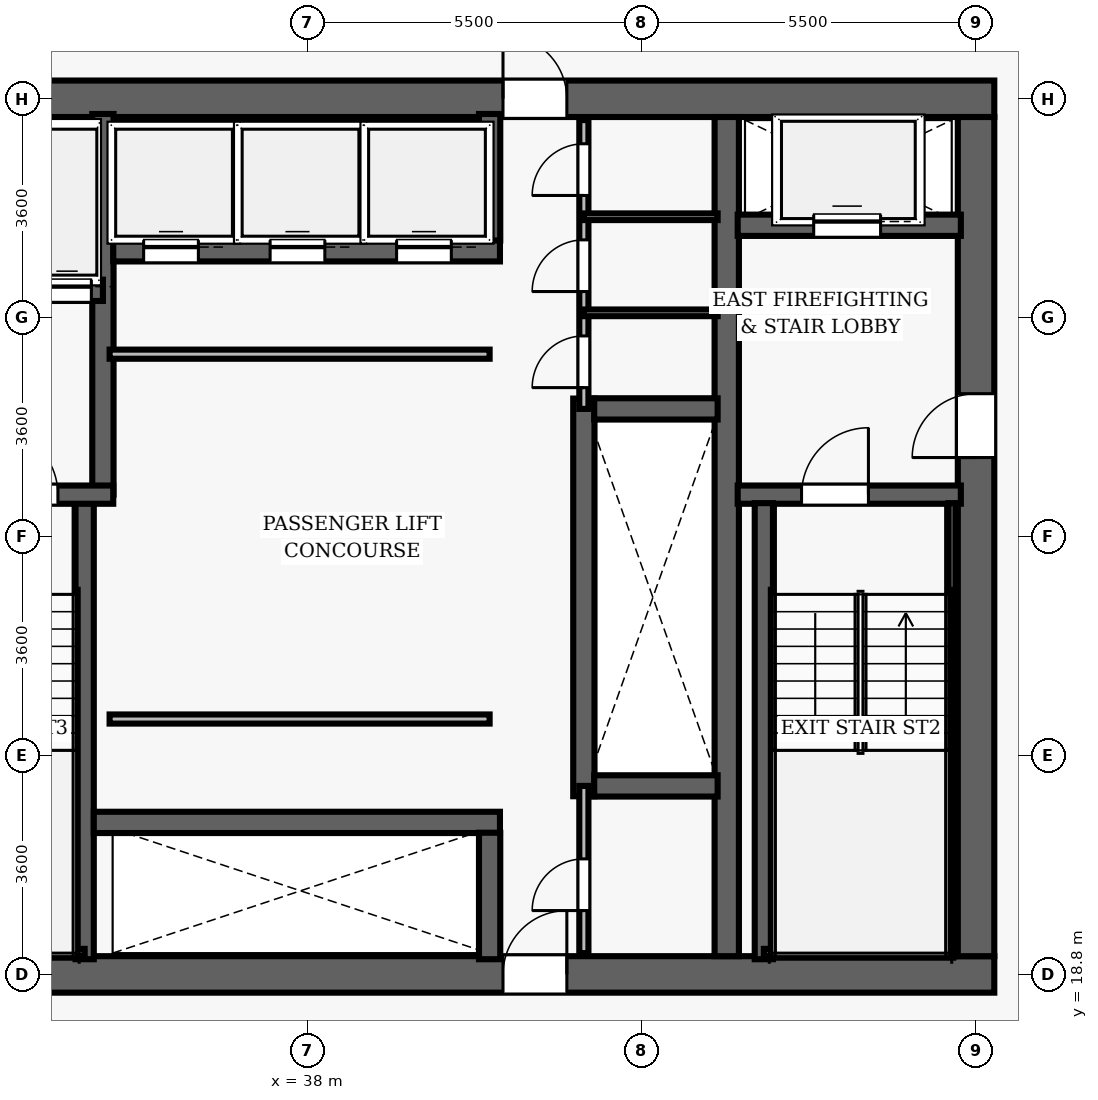
"""IFC4 building model, lengths in metres.
Left out: names, types, materials, properties, quantities, classifications, styles, units other than length and angle.
Written with IfcOpenShell. Run it as: python <this file> out.ifc"""

import sys

from ifc_helpers import new_model, si_unit, direction, frame, frame_2d, origin, place, context, subcontext, project, spatial, rectangle, extrude, element, fill, save


model = new_model("IFC4")
c1 = context("Model", 3, precision=1e-05, world=origin(), true_north=direction((0.0, 1.0)))
c2 = subcontext(c1, "Body", "Model", "MODEL_VIEW")
j1 = project(units=[si_unit("LENGTHUNIT", "METRE"), si_unit("PLANEANGLEUNIT", "RADIAN")], contexts=[c1])
p1 = place(None, origin())
s1 = spatial("IfcSite", under=j1, at=p1, CompositionType="ELEMENT")
p2 = place(p1, origin())
s2 = spatial("IfcBuilding", under=s1, at=p2, CompositionType="ELEMENT")
p3 = place(p2, frame((0.0, 0.0, 51.9)))
s3 = spatial("IfcBuildingStorey", under=s2, at=p3, CompositionType="ELEMENT", Elevation=51.9)
p4 = place(p3, frame((26.7, 18.8, 0.0), z_axis=(0.0, 0.0, 1.0), x_axis=(1.0, 0.0, 0.0)))
e1 = element("IfcWall", 1, at=p4, inside=s3, PredefinedType="SHEAR", context=c2, shape_type="SweptSolid", body=[
    extrude(rectangle(XDim=22.6, YDim=0.6, at=frame_2d((11.3, 0.0))), origin(), (0.0, 0.0, 1.0), 3.5),
])
p5 = place(p4, frame((14.52, 0.0, 0.0)))
e2 = element("IfcOpeningElement", 2, at=p5, cuts=e1, PredefinedType="OPENING", context=c2, shape_type="SweptSolid", body=[
    extrude(rectangle(XDim=1.05, YDim=2.15, at=frame_2d((0.525, 1.075))), frame((0.0, 0.31, 0.0), z_axis=(0.0, -1.0, 0.0), x_axis=(1.0, 0.0, 0.0)), (0.0, 0.0, 1.0), 0.62),
])
p6 = place(p3, frame((26.7, 33.2, 0.0), z_axis=(0.0, 0.0, 1.0), x_axis=(1.0, 0.0, 0.0)))
e3 = element("IfcWall", 3, at=p6, inside=s3, PredefinedType="SHEAR", context=c2, shape_type="SweptSolid", body=[
    extrude(rectangle(XDim=22.6, YDim=0.6, at=frame_2d((11.3, 0.0))), origin(), (0.0, 0.0, 1.0), 3.5),
])
p7 = place(p6, frame((4.62, 0.0, 0.0)))
e4 = element("IfcOpeningElement", 4, at=p7, cuts=e3, PredefinedType="OPENING", context=c2, shape_type="SweptSolid", body=[
    extrude(rectangle(XDim=1.05, YDim=2.15, at=frame_2d((0.525, 1.075))), frame((0.0, 0.31, 0.0), z_axis=(0.0, -1.0, 0.0), x_axis=(1.0, 0.0, 0.0)), (0.0, 0.0, 1.0), 0.62),
])
p8 = place(p6, frame((14.52, 0.0, 0.0)))
e5 = element("IfcOpeningElement", 5, at=p8, cuts=e3, PredefinedType="OPENING", context=c2, shape_type="SweptSolid", body=[
    extrude(rectangle(XDim=1.05, YDim=2.15, at=frame_2d((0.525, 1.075))), frame((0.0, 0.31, 0.0), z_axis=(0.0, -1.0, 0.0), x_axis=(1.0, 0.0, 0.0)), (0.0, 0.0, 1.0), 0.62),
])
p9 = place(p3, frame((49.0, 19.1, 0.0), z_axis=(0.0, 0.0, 1.0), x_axis=(0.0, 1.0, 0.0)))
e6 = element("IfcWall", 6, at=p9, inside=s3, PredefinedType="SHEAR", context=c2, shape_type="SweptSolid", body=[
    extrude(rectangle(XDim=13.8, YDim=0.6, at=frame_2d((6.9, 0.0))), origin(), (0.0, 0.0, 1.0), 3.5),
])
p10 = place(p9, frame((8.2, 0.0, 0.0)))
e7 = element("IfcOpeningElement", 7, at=p10, cuts=e6, PredefinedType="OPENING", context=c2, shape_type="SweptSolid", body=[
    extrude(rectangle(XDim=1.05, YDim=2.15, at=frame_2d((0.525, 1.075))), frame((0.0, 0.31, 0.0), z_axis=(0.0, -1.0, 0.0), x_axis=(1.0, 0.0, 0.0)), (0.0, 0.0, 1.0), 0.62),
])
p11 = place(p3, frame((44.9, 19.1, 0.0), z_axis=(0.0, 0.0, 1.0), x_axis=(0.0, 1.0, 0.0)))
e8 = element("IfcWall", 8, at=p11, inside=s3, PredefinedType="SHEAR", context=c2, shape_type="SweptSolid", body=[
    extrude(rectangle(XDim=13.8, YDim=0.4, at=frame_2d((6.9, 0.0))), origin(), (0.0, 0.0, 1.0), 3.5),
])
p12 = place(p3, frame((45.08, 26.69, 0.0), z_axis=(0.0, 0.0, 1.0), x_axis=(1.0, 0.0, 0.0)))
e9 = element("IfcWall", 9, at=p12, inside=s3, PredefinedType="SHEAR", context=c2, shape_type="SweptSolid", body=[
    extrude(rectangle(XDim=3.67, YDim=0.3, at=frame_2d((1.835, 0.0))), origin(), (0.0, 0.0, 1.0), 3.5),
])
p13 = place(p12, frame((1.05, 0.0, 0.0)))
e10 = element("IfcOpeningElement", 10, at=p13, cuts=e9, PredefinedType="OPENING", context=c2, shape_type="SweptSolid", body=[
    extrude(rectangle(XDim=1.1, YDim=2.15, at=frame_2d((0.55, 1.075))), frame((0.0, 0.16, 0.0), z_axis=(0.0, -1.0, 0.0), x_axis=(1.0, 0.0, 0.0)), (0.0, 0.0, 1.0), 0.32),
])
p14 = place(p3, frame((45.51, 19.05, 0.0), z_axis=(0.0, 0.0, 1.0), x_axis=(0.0, 1.0, 0.0)))
e11 = element("IfcWall", 11, at=p14, inside=s3, PredefinedType="SHEAR", context=c2, shape_type="SweptSolid", body=[
    extrude(rectangle(XDim=7.5, YDim=0.3, at=frame_2d((3.75, 0.0))), origin(), (0.0, 0.0, 1.0), 3.5),
])
p15 = place(p3, frame((48.605, 19.1, 0.0), z_axis=(0.0, 0.0, 1.0), x_axis=(0.0, 1.0, 0.0)))
e12 = element("IfcWall", 12, at=p15, inside=s3, PredefinedType="SHEAR", context=c2, shape_type="SweptSolid", body=[
    extrude(rectangle(XDim=7.45, YDim=0.12, at=frame_2d((3.725, 0.0))), origin(), (0.0, 0.0, 1.0), 3.5),
])
p16 = place(p3, frame((45.51, 19.16, 0.0), z_axis=(0.0, 0.0, 1.0), x_axis=(1.0, 0.0, 0.0)))
e13 = element("IfcWall", 13, at=p16, inside=s3, PredefinedType="SHEAR", context=c2, shape_type="SweptSolid", body=[
    extrude(rectangle(XDim=3.095, YDim=0.12, at=frame_2d((1.547, 0.0))), origin(), (0.0, 0.0, 1.0), 3.5),
])
p17 = place(p3, frame((45.08, 31.12, 0.0), z_axis=(0.0, 0.0, 1.0), x_axis=(1.0, 0.0, 0.0)))
e14 = element("IfcWall", 14, at=p17, inside=s3, PredefinedType="SHEAR", context=c2, shape_type="SweptSolid", body=[
    extrude(rectangle(XDim=3.67, YDim=0.35, at=frame_2d((1.835, 0.0))), origin(), (0.0, 0.0, 1.0), 2.6),
])
p18 = place(p17, frame((1.25, 0.0, 0.0)))
e15 = element("IfcOpeningElement", 15, at=p18, cuts=e14, PredefinedType="OPENING", context=c2, shape_type="SweptSolid", body=[
    extrude(rectangle(XDim=1.1, YDim=2.15, at=frame_2d((0.55, 1.075))), frame((0.0, 0.185, 0.0), z_axis=(0.0, -1.0, 0.0), x_axis=(1.0, 0.0, 0.0)), (0.0, 0.0, 1.0), 0.37),
])
p19 = place(p3, frame((34.34, 19.05, 0.0), z_axis=(0.0, 0.0, 1.0), x_axis=(0.0, 1.0, 0.0)))
e16 = element("IfcWall", 16, at=p19, inside=s3, PredefinedType="SHEAR", context=c2, shape_type="SweptSolid", body=[
    extrude(rectangle(XDim=7.5, YDim=0.3, at=frame_2d((3.75, 0.0))), origin(), (0.0, 0.0, 1.0), 3.5),
])
p20 = place(p3, frame((34.64, 26.69, 0.0), z_axis=(0.0, 0.0, 1.0), x_axis=(0.0, 1.0, 0.0)))
e17 = element("IfcWall", 17, at=p20, inside=s3, PredefinedType="SHEAR", context=c2, shape_type="SweptSolid", body=[
    extrude(rectangle(XDim=6.26, YDim=0.35, at=frame_2d((3.13, 0.0))), origin(), (0.0, 0.0, 1.0), 3.5),
])
p21 = place(p3, frame((31.25, 26.69, 0.0), z_axis=(0.0, 0.0, 1.0), x_axis=(1.0, 0.0, 0.0)))
e18 = element("IfcWall", 18, at=p21, inside=s3, PredefinedType="SHEAR", context=c2, shape_type="SweptSolid", body=[
    extrude(rectangle(XDim=3.56, YDim=0.3, at=frame_2d((1.78, 0.0))), origin(), (0.0, 0.0, 1.0), 3.5),
])
p22 = place(p21, frame((1.55, 0.0, 0.0)))
e19 = element("IfcOpeningElement", 19, at=p22, cuts=e18, PredefinedType="OPENING", context=c2, shape_type="SweptSolid", body=[
    extrude(rectangle(XDim=1.1, YDim=2.15, at=frame_2d((0.55, 1.075))), frame((0.0, 0.16, 0.0), z_axis=(0.0, -1.0, 0.0), x_axis=(1.0, 0.0, 0.0)), (0.0, 0.0, 1.0), 0.32),
])
p23 = place(p3, frame((31.3, 19.16, 0.0), z_axis=(0.0, 0.0, 1.0), x_axis=(1.0, 0.0, 0.0)))
e20 = element("IfcWall", 20, at=p23, inside=s3, PredefinedType="SHEAR", context=c2, shape_type="SweptSolid", body=[
    extrude(rectangle(XDim=3.04, YDim=0.12, at=frame_2d((1.52, 0.0))), origin(), (0.0, 0.0, 1.0), 3.5),
])
p24 = place(p3, frame((32.23, 30.05, 0.0), z_axis=(0.0, 0.0, 1.0), x_axis=(1.0, 0.0, 0.0)))
e21 = element("IfcWall", 21, at=p24, inside=s3, PredefinedType="SHEAR", context=c2, shape_type="SweptSolid", body=[
    extrude(rectangle(XDim=2.41, YDim=0.35, at=frame_2d((1.205, 0.0))), origin(), (0.0, 0.0, 1.0), 2.6),
])
p25 = place(p24, frame((0.42, 0.0, 0.0)))
e22 = element("IfcOpeningElement", 22, at=p25, cuts=e21, PredefinedType="OPENING", context=c2, shape_type="SweptSolid", body=[
    extrude(rectangle(XDim=0.8, YDim=2.15, at=frame_2d((0.4, 1.075))), frame((0.0, 0.185, 0.0), z_axis=(0.0, -1.0, 0.0), x_axis=(1.0, 0.0, 0.0)), (0.0, 0.0, 1.0), 0.37),
])
p26 = place(p24, frame((1.42, 0.0, 0.0)))
e23 = element("IfcOpeningElement", 23, at=p26, cuts=e21, PredefinedType="OPENING", context=c2, shape_type="SweptSolid", body=[
    extrude(rectangle(XDim=0.8, YDim=2.15, at=frame_2d((0.4, 1.075))), frame((0.0, 0.185, 0.0), z_axis=(0.0, -1.0, 0.0), x_axis=(1.0, 0.0, 0.0)), (0.0, 0.0, 1.0), 0.37),
])
p27 = place(p3, frame((42.55, 21.73, 0.0), z_axis=(0.0, 0.0, 1.0), x_axis=(0.0, 1.0, 0.0)))
e24 = element("IfcWall", 24, at=p27, inside=s3, PredefinedType="SHEAR", context=c2, shape_type="SweptSolid", body=[
    extrude(rectangle(XDim=6.54, YDim=0.35, at=frame_2d((3.27, 0.0))), origin(), (0.0, 0.0, 1.0), 2.6),
])
for number, where, z_axis, x_axis in (
    (25, (42.72, 21.9, 0.0), (0.0, 0.0, 1.0), (1.0, 0.0, 0.0)),
    (26, (42.72, 28.1, 0.0), (0.0, 0.0, 1.0), (1.0, 0.0, 0.0)),
):
    element("IfcWall", number, at=place(p3, frame(where, z_axis=z_axis, x_axis=x_axis)), inside=s3, PredefinedType="SHEAR", context=c2, shape_type="SweptSolid", body=[
        extrude(rectangle(XDim=2.03, YDim=0.35, at=frame_2d((1.015, 0.0))), origin(), (0.0, 0.0, 1.0), 2.6),
    ])
p28 = place(p3, frame((34.81, 30.7, 0.0), z_axis=(0.0, 0.0, 1.0), x_axis=(1.0, 0.0, 0.0)))
e27 = element("IfcWall", 27, at=p28, inside=s3, PredefinedType="SHEAR", context=c2, shape_type="SweptSolid", body=[
    extrude(rectangle(XDim=6.36, YDim=0.35, at=frame_2d((3.18, 0.0))), origin(), (0.0, 0.0, 1.0), 2.6),
])
p29 = place(p28, frame((0.5, 0.0, 0.0)))
e28 = element("IfcOpeningElement", 28, at=p29, cuts=e27, PredefinedType="OPENING", context=c2, shape_type="SweptSolid", body=[
    extrude(rectangle(XDim=0.9, YDim=2.15, at=frame_2d((0.45, 1.075))), frame((0.0, 0.185, 0.0), z_axis=(0.0, -1.0, 0.0), x_axis=(1.0, 0.0, 0.0)), (0.0, 0.0, 1.0), 0.37),
])
p30 = place(p28, frame((2.58, 0.0, 0.0)))
e29 = element("IfcOpeningElement", 29, at=p30, cuts=e27, PredefinedType="OPENING", context=c2, shape_type="SweptSolid", body=[
    extrude(rectangle(XDim=0.9, YDim=2.15, at=frame_2d((0.45, 1.075))), frame((0.0, 0.185, 0.0), z_axis=(0.0, -1.0, 0.0), x_axis=(1.0, 0.0, 0.0)), (0.0, 0.0, 1.0), 0.37),
])
p31 = place(p28, frame((4.66, 0.0, 0.0)))
e30 = element("IfcOpeningElement", 30, at=p31, cuts=e27, PredefinedType="OPENING", context=c2, shape_type="SweptSolid", body=[
    extrude(rectangle(XDim=0.9, YDim=2.15, at=frame_2d((0.45, 1.075))), frame((0.0, 0.185, 0.0), z_axis=(0.0, -1.0, 0.0), x_axis=(1.0, 0.0, 0.0)), (0.0, 0.0, 1.0), 0.37),
])
p32 = place(p3, frame((41.0, 30.87, 0.0), z_axis=(0.0, 0.0, 1.0), x_axis=(0.0, 1.0, 0.0)))
e31 = element("IfcWall", 31, at=p32, inside=s3, PredefinedType="SHEAR", context=c2, shape_type="SweptSolid", body=[
    extrude(rectangle(XDim=2.08, YDim=0.35, at=frame_2d((1.04, 0.0))), origin(), (0.0, 0.0, 1.0), 2.6),
])
p33 = place(p3, frame((34.49, 21.3, 0.0), z_axis=(0.0, 0.0, 1.0), x_axis=(1.0, 0.0, 0.0)))
e32 = element("IfcWall", 32, at=p33, inside=s3, PredefinedType="SHEAR", context=c2, shape_type="SweptSolid", body=[
    extrude(rectangle(XDim=6.68, YDim=0.35, at=frame_2d((3.34, 0.0))), origin(), (0.0, 0.0, 1.0), 2.6),
])
p34 = place(p3, frame((41.0, 19.05, 0.0), z_axis=(0.0, 0.0, 1.0), x_axis=(0.0, 1.0, 0.0)))
e33 = element("IfcWall", 33, at=p34, inside=s3, PredefinedType="SHEAR", context=c2, shape_type="SweptSolid", body=[
    extrude(rectangle(XDim=2.08, YDim=0.35, at=frame_2d((1.04, 0.0))), origin(), (0.0, 0.0, 1.0), 2.6),
])
for number, where, z_axis, x_axis in (
    (34, (34.75, 29.0, 0.0), (0.0, 0.0, 1.0), (1.0, 0.0, 0.0)),
    (35, (34.75, 23.0, 0.0), (0.0, 0.0, 1.0), (1.0, 0.0, 0.0)),
):
    element("IfcWall", number, at=place(p3, frame(where, z_axis=z_axis, x_axis=x_axis)), inside=s3, PredefinedType="PARTITIONING", context=c2, shape_type="SweptSolid", body=[
        extrude(rectangle(XDim=6.25, YDim=0.15, at=frame_2d((3.125, 0.0))), origin(), (0.0, 0.0, 1.0), 2.6),
    ])
p35 = place(p3, frame((42.55, 28.1, 0.0), z_axis=(0.0, 0.0, 1.0), x_axis=(0.0, 1.0, 0.0)))
e36 = element("IfcWall", 36, at=p35, inside=s3, PredefinedType="PARTITIONING", context=c2, shape_type="SweptSolid", body=[
    extrude(rectangle(XDim=4.75, YDim=0.15, at=frame_2d((2.375, 0.0))), origin(), (0.0, 0.0, 1.0), 2.6),
])
p36 = place(p35, frame((0.35, 0.0, 0.0)))
e37 = element("IfcOpeningElement", 37, at=p36, cuts=e36, PredefinedType="OPENING", context=c2, shape_type="SweptSolid", body=[
    extrude(rectangle(XDim=0.85, YDim=2.1, at=frame_2d((0.425, 1.05))), frame((0.0, 0.085, 0.0), z_axis=(0.0, -1.0, 0.0), x_axis=(1.0, 0.0, 0.0)), (0.0, 0.0, 1.0), 0.17),
])
p37 = place(p35, frame((1.93, 0.0, 0.0)))
e38 = element("IfcOpeningElement", 38, at=p37, cuts=e36, PredefinedType="OPENING", context=c2, shape_type="SweptSolid", body=[
    extrude(rectangle(XDim=0.85, YDim=2.1, at=frame_2d((0.425, 1.05))), frame((0.0, 0.085, 0.0), z_axis=(0.0, -1.0, 0.0), x_axis=(1.0, 0.0, 0.0)), (0.0, 0.0, 1.0), 0.17),
])
p38 = place(p35, frame((3.51, 0.0, 0.0)))
e39 = element("IfcOpeningElement", 39, at=p38, cuts=e36, PredefinedType="OPENING", context=c2, shape_type="SweptSolid", body=[
    extrude(rectangle(XDim=0.85, YDim=2.1, at=frame_2d((0.425, 1.05))), frame((0.0, 0.085, 0.0), z_axis=(0.0, -1.0, 0.0), x_axis=(1.0, 0.0, 0.0)), (0.0, 0.0, 1.0), 0.17),
])
for number, where, z_axis, x_axis in (
    (40, (42.55, 29.68, 0.0), (0.0, 0.0, 1.0), (1.0, 0.0, 0.0)),
    (41, (42.55, 31.26, 0.0), (0.0, 0.0, 1.0), (1.0, 0.0, 0.0)),
):
    element("IfcWall", number, at=place(p3, frame(where, z_axis=z_axis, x_axis=x_axis)), inside=s3, PredefinedType="PARTITIONING", context=c2, shape_type="SweptSolid", body=[
        extrude(rectangle(XDim=2.2, YDim=0.11, at=frame_2d((1.1, 0.0))), origin(), (0.0, 0.0, 1.0), 2.6),
    ])
p39 = place(p3, frame((42.55, 19.15, 0.0), z_axis=(0.0, 0.0, 1.0), x_axis=(0.0, 1.0, 0.0)))
e42 = element("IfcWall", 42, at=p39, inside=s3, PredefinedType="PARTITIONING", context=c2, shape_type="SweptSolid", body=[
    extrude(rectangle(XDim=2.75, YDim=0.15, at=frame_2d((1.375, 0.0))), origin(), (0.0, 0.0, 1.0), 2.6),
])
p40 = place(p39, frame((0.7, 0.0, 0.0)))
e43 = element("IfcOpeningElement", 43, at=p40, cuts=e42, PredefinedType="OPENING", context=c2, shape_type="SweptSolid", body=[
    extrude(rectangle(XDim=0.85, YDim=2.1, at=frame_2d((0.425, 1.05))), frame((0.0, 0.085, 0.0), z_axis=(0.0, -1.0, 0.0), x_axis=(1.0, 0.0, 0.0)), (0.0, 0.0, 1.0), 0.17),
])
p41 = place(p13, origin())
e44 = element("IfcDoor", 44, at=p41, inside=s3, OperationType="SINGLE_SWING_RIGHT", PredefinedType="DOOR", context=c2, shape_type="SweptSolid", body=[
    extrude(rectangle(XDim=1.1, YDim=2.15, at=frame_2d((0.55, 1.075))), frame((0.0, 0.025, 0.0), z_axis=(0.0, -1.0, 0.0), x_axis=(1.0, 0.0, 0.0)), (0.0, 0.0, 1.0), 0.05),
])
fill(e10, e44)
p42 = place(p10, origin())
e45 = element("IfcDoor", 45, at=p42, inside=s3, OperationType="SINGLE_SWING_LEFT", PredefinedType="DOOR", context=c2, shape_type="SweptSolid", body=[
    extrude(rectangle(XDim=1.05, YDim=2.15, at=frame_2d((0.525, 1.075))), frame((0.0, 0.025, 0.0), z_axis=(0.0, -1.0, 0.0), x_axis=(1.0, 0.0, 0.0)), (0.0, 0.0, 1.0), 0.05),
])
fill(e7, e45)
p43 = place(p22, origin())
e46 = element("IfcDoor", 46, at=p43, inside=s3, OperationType="SINGLE_SWING_LEFT", PredefinedType="DOOR", context=c2, shape_type="SweptSolid", body=[
    extrude(rectangle(XDim=1.1, YDim=2.15, at=frame_2d((0.55, 1.075))), frame((0.0, 0.025, 0.0), z_axis=(0.0, -1.0, 0.0), x_axis=(1.0, 0.0, 0.0)), (0.0, 0.0, 1.0), 0.05),
])
fill(e19, e46)
p44 = place(p8, origin())
e47 = element("IfcDoor", 47, at=p44, inside=s3, OperationType="SINGLE_SWING_LEFT", PredefinedType="DOOR", context=c2, shape_type="SweptSolid", body=[
    extrude(rectangle(XDim=1.05, YDim=2.15, at=frame_2d((0.525, 1.075))), frame((0.0, 0.025, 0.0), z_axis=(0.0, -1.0, 0.0), x_axis=(1.0, 0.0, 0.0)), (0.0, 0.0, 1.0), 0.05),
])
fill(e5, e47)
p45 = place(p5, origin())
e48 = element("IfcDoor", 48, at=p45, inside=s3, OperationType="SINGLE_SWING_RIGHT", PredefinedType="DOOR", context=c2, shape_type="SweptSolid", body=[
    extrude(rectangle(XDim=1.05, YDim=2.15, at=frame_2d((0.525, 1.075))), frame((0.0, 0.025, 0.0), z_axis=(0.0, -1.0, 0.0), x_axis=(1.0, 0.0, 0.0)), (0.0, 0.0, 1.0), 0.05),
])
fill(e2, e48)
p46 = place(p36, origin())
e49 = element("IfcDoor", 49, at=p46, inside=s3, OperationType="SINGLE_SWING_LEFT", PredefinedType="DOOR", context=c2, shape_type="SweptSolid", body=[
    extrude(rectangle(XDim=0.85, YDim=2.1, at=frame_2d((0.425, 1.05))), frame((0.0, 0.025, 0.0), z_axis=(0.0, -1.0, 0.0), x_axis=(1.0, 0.0, 0.0)), (0.0, 0.0, 1.0), 0.05),
])
fill(e37, e49)
p47 = place(p37, origin())
e50 = element("IfcDoor", 50, at=p47, inside=s3, OperationType="SINGLE_SWING_LEFT", PredefinedType="DOOR", context=c2, shape_type="SweptSolid", body=[
    extrude(rectangle(XDim=0.85, YDim=2.1, at=frame_2d((0.425, 1.05))), frame((0.0, 0.025, 0.0), z_axis=(0.0, -1.0, 0.0), x_axis=(1.0, 0.0, 0.0)), (0.0, 0.0, 1.0), 0.05),
])
fill(e38, e50)
p48 = place(p38, origin())
e51 = element("IfcDoor", 51, at=p48, inside=s3, OperationType="SINGLE_SWING_LEFT", PredefinedType="DOOR", context=c2, shape_type="SweptSolid", body=[
    extrude(rectangle(XDim=0.85, YDim=2.1, at=frame_2d((0.425, 1.05))), frame((0.0, 0.025, 0.0), z_axis=(0.0, -1.0, 0.0), x_axis=(1.0, 0.0, 0.0)), (0.0, 0.0, 1.0), 0.05),
])
fill(e39, e51)
p49 = place(p40, origin())
e52 = element("IfcDoor", 52, at=p49, inside=s3, OperationType="SINGLE_SWING_LEFT", PredefinedType="DOOR", context=c2, shape_type="SweptSolid", body=[
    extrude(rectangle(XDim=0.85, YDim=2.1, at=frame_2d((0.425, 1.05))), frame((0.0, 0.025, 0.0), z_axis=(0.0, -1.0, 0.0), x_axis=(1.0, 0.0, 0.0)), (0.0, 0.0, 1.0), 0.05),
])
fill(e43, e52)
p50 = place(p29, origin())
e53 = element("IfcDoor", 53, at=p50, inside=s3, OperationType="SLIDING_TO_LEFT", PredefinedType="DOOR", context=c2, shape_type="SweptSolid", body=[
    extrude(rectangle(XDim=0.9, YDim=2.15, at=frame_2d((0.45, 1.075))), frame((0.0, 0.025, 0.0), z_axis=(0.0, -1.0, 0.0), x_axis=(1.0, 0.0, 0.0)), (0.0, 0.0, 1.0), 0.05),
])
fill(e28, e53)
p51 = place(p30, origin())
e54 = element("IfcDoor", 54, at=p51, inside=s3, OperationType="SLIDING_TO_LEFT", PredefinedType="DOOR", context=c2, shape_type="SweptSolid", body=[
    extrude(rectangle(XDim=0.9, YDim=2.15, at=frame_2d((0.45, 1.075))), frame((0.0, 0.025, 0.0), z_axis=(0.0, -1.0, 0.0), x_axis=(1.0, 0.0, 0.0)), (0.0, 0.0, 1.0), 0.05),
])
fill(e29, e54)
p52 = place(p31, origin())
e55 = element("IfcDoor", 55, at=p52, inside=s3, OperationType="SLIDING_TO_LEFT", PredefinedType="DOOR", context=c2, shape_type="SweptSolid", body=[
    extrude(rectangle(XDim=0.9, YDim=2.15, at=frame_2d((0.45, 1.075))), frame((0.0, 0.025, 0.0), z_axis=(0.0, -1.0, 0.0), x_axis=(1.0, 0.0, 0.0)), (0.0, 0.0, 1.0), 0.05),
])
fill(e30, e55)
p53 = place(p18, origin())
e56 = element("IfcDoor", 56, at=p53, inside=s3, OperationType="SLIDING_TO_LEFT", PredefinedType="DOOR", context=c2, shape_type="SweptSolid", body=[
    extrude(rectangle(XDim=1.1, YDim=2.15, at=frame_2d((0.55, 1.075))), frame((0.0, 0.025, 0.0), z_axis=(0.0, -1.0, 0.0), x_axis=(1.0, 0.0, 0.0)), (0.0, 0.0, 1.0), 0.05),
])
fill(e15, e56)
p54 = place(p26, origin())
e57 = element("IfcDoor", 57, at=p54, inside=s3, OperationType="SLIDING_TO_LEFT", PredefinedType="DOOR", context=c2, shape_type="SweptSolid", body=[
    extrude(rectangle(XDim=0.8, YDim=2.15, at=frame_2d((0.4, 1.075))), frame((0.0, 0.025, 0.0), z_axis=(0.0, -1.0, 0.0), x_axis=(1.0, 0.0, 0.0)), (0.0, 0.0, 1.0), 0.05),
])
fill(e23, e57)
save(model, sys.argv[1])
